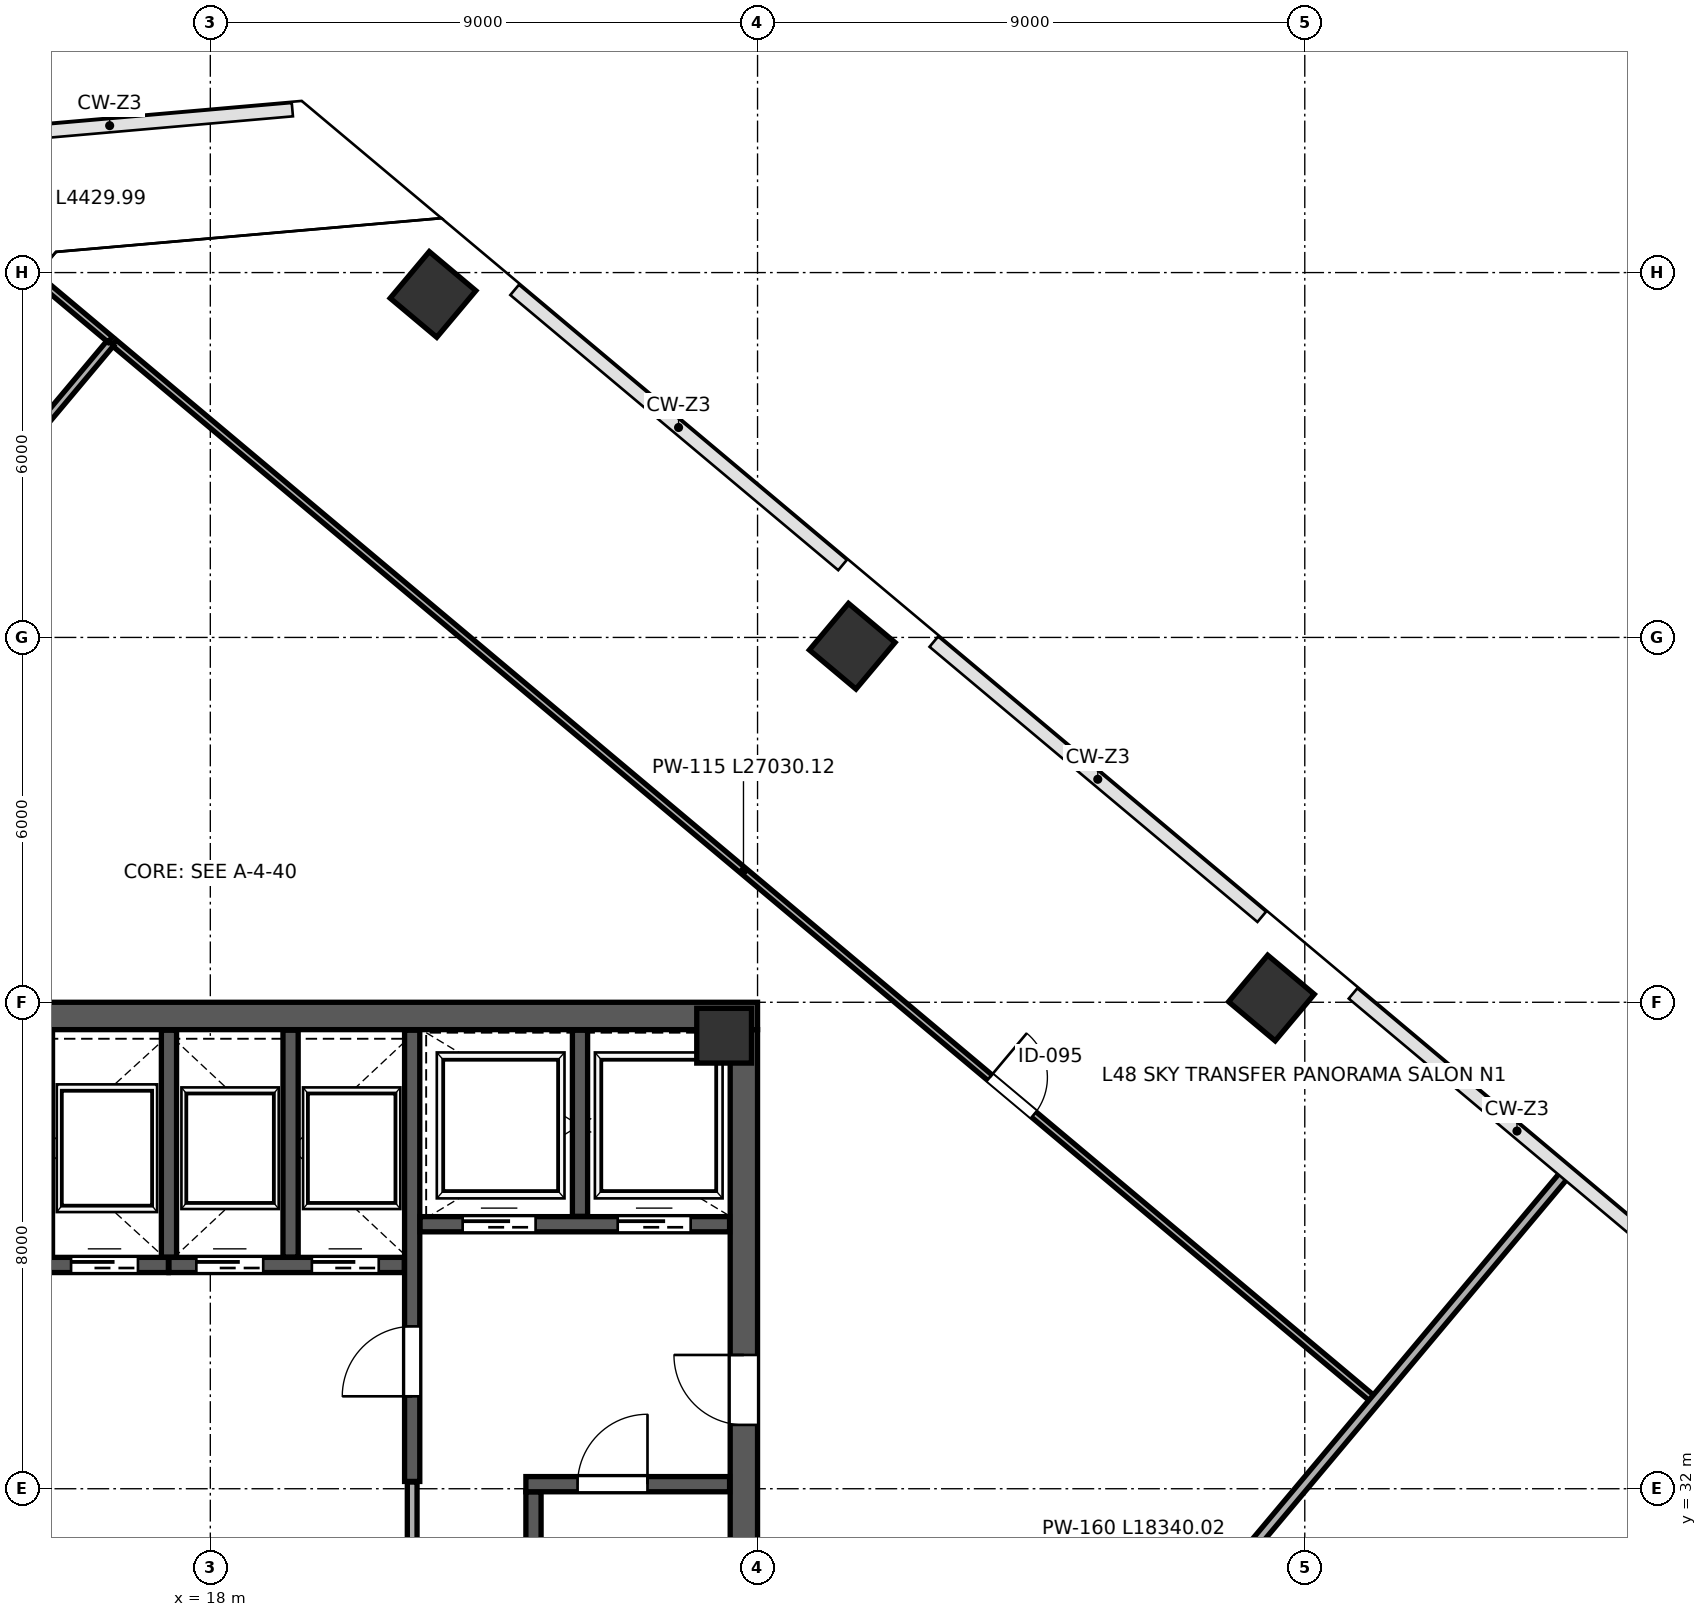
"""IFC4 building model, lengths in metres.
Left out: names, types, materials, properties, quantities, classifications, styles, units other than length and angle.
Written with IfcOpenShell. Run it as: python <this file> out.ifc"""

import sys

from ifc_helpers import new_model, si_unit, direction, frame, frame_2d, origin, origin_2d, place, context, subcontext, project, spatial, rectangle, extrude, source, transform, mapped, element, fill, save


model = new_model("IFC4")
c1 = context("Model", 3, precision=1e-05, world=origin(), true_north=direction((0.0, 1.0)))
c2 = subcontext(c1, "Body", "Model", "MODEL_VIEW")
j1 = project(units=[si_unit("LENGTHUNIT", "METRE"), si_unit("PLANEANGLEUNIT", "RADIAN")], contexts=[c1])
p1 = place(None, origin())
s1 = spatial("IfcSite", under=j1, at=p1, CompositionType="ELEMENT")
p2 = place(p1, origin())
s2 = spatial("IfcBuilding", under=s1, at=p2, CompositionType="ELEMENT")
p3 = place(p2, frame((0.0, 0.0, 215.2)))
s3 = spatial("IfcBuildingStorey", under=s2, at=p3, CompositionType="ELEMENT", Elevation=215.2)
m1 = source(origin(), c2, "Body", "SweptSolid", [
    extrude(rectangle(XDim=0.9, YDim=0.9, at=origin_2d()), origin(), (0.0, 0.0, 1.0), 5.399),
])
p4 = place(p3, frame((26.45, 39.45, 0.001), z_axis=(0.0, 0.0, 1.0), x_axis=(1.0, 0.0, 0.0)))
e1 = element("IfcColumn", 1, at=p4, inside=s3, PredefinedType="COLUMN", context=c2, shape_type="MappedRepresentation", body=[
    mapped(m1, transform((0.0, 0.0, 0.0), scale=1.0)),
])
m2 = source(origin(), c2, "Body", "SweptSolid", [
    extrude(rectangle(XDim=1.0, YDim=1.0, at=origin_2d()), origin(), (0.0, 0.0, 1.0), 5.399),
])
for number, where, z_axis, x_axis in (
    (2, (21.663, 51.64, 0.001), (0.0, 0.0, 1.0), (-0.766, 0.643, 0.0)),
    (3, (28.557, 45.855, 0.001), (0.0, 0.0, 1.0), (-0.766, 0.643, 0.0)),
    (4, (35.451, 40.07, 0.001), (0.0, 0.0, 1.0), (-0.766, 0.643, 0.0)),
):
    element("IfcColumn", number, at=place(p3, frame(where, z_axis=z_axis, x_axis=x_axis)), inside=s3, PredefinedType="COLUMN", context=c2, shape_type="MappedRepresentation", body=[
        mapped(m2, transform((0.0, 0.0, 0.0), scale=1.0)),
    ])
p5 = place(p3, frame((26.775, 24.45, 0.0), z_axis=(0.0, 0.0, 1.0), x_axis=(0.0, 1.0, 0.0)))
e5 = element("IfcWall", 5, at=p5, inside=s3, PredefinedType="SHEAR", context=c2, shape_type="SweptSolid", body=[
    extrude(rectangle(XDim=15.1, YDim=0.45, at=frame_2d((7.55, 0.0))), origin(), (0.0, 0.0, 1.0), 5.16),
])
p6 = place(p5, frame((8.6, 0.0, 0.0)))
e6 = element("IfcOpeningElement", 6, at=p6, cuts=e5, PredefinedType="OPENING", context=c2, shape_type="SweptSolid", body=[
    extrude(rectangle(XDim=1.15, YDim=2.2, at=frame_2d((0.575, 1.1))), frame((0.0, 0.235, 0.0), z_axis=(0.0, -1.0, 0.0), x_axis=(1.0, 0.0, 0.0)), (0.0, 0.0, 1.0), 0.47),
])
p7 = place(p3, frame((9.0, 39.775, 0.0), z_axis=(0.0, 0.0, 1.0), x_axis=(1.0, 0.0, 0.0)))
e7 = element("IfcWall", 7, at=p7, inside=s3, PredefinedType="SHEAR", context=c2, shape_type="SweptSolid", body=[
    extrude(rectangle(XDim=18.0, YDim=0.45, at=frame_2d((9.0, 0.0))), origin(), (0.0, 0.0, 1.0), 5.16),
])
p8 = place(p3, frame((23.315, 24.46, 0.0), z_axis=(0.0, 0.0, 1.0), x_axis=(0.0, 1.0, 0.0)))
e8 = element("IfcWall", 8, at=p8, inside=s3, PredefinedType="SHEAR", context=c2, shape_type="SweptSolid", body=[
    extrude(rectangle(XDim=7.49, YDim=0.25, at=frame_2d((3.745, 0.0))), origin(), (0.0, 0.0, 1.0), 5.16),
])
p9 = place(p3, frame((23.19, 32.075, 0.0), z_axis=(0.0, 0.0, 1.0), x_axis=(1.0, 0.0, 0.0)))
e9 = element("IfcWall", 9, at=p9, inside=s3, PredefinedType="SHEAR", context=c2, shape_type="SweptSolid", body=[
    extrude(rectangle(XDim=3.35, YDim=0.25, at=frame_2d((1.675, 0.0))), origin(), (0.0, 0.0, 1.0), 5.16),
])
p10 = place(p9, frame((0.85, 0.0, 0.0)))
e10 = element("IfcOpeningElement", 10, at=p10, cuts=e9, PredefinedType="OPENING", context=c2, shape_type="SweptSolid", body=[
    extrude(rectangle(XDim=1.15, YDim=2.2, at=frame_2d((0.575, 1.1))), frame((0.0, 0.135, 0.0), z_axis=(0.0, -1.0, 0.0), x_axis=(1.0, 0.0, 0.0)), (0.0, 0.0, 1.0), 0.27),
])
p11 = place(p3, frame((21.32, 32.12, 0.0), z_axis=(0.0, 0.0, 1.0), x_axis=(0.0, 1.0, 0.0)))
e11 = element("IfcWall", 11, at=p11, inside=s3, PredefinedType="SHEAR", context=c2, shape_type="SweptSolid", body=[
    extrude(rectangle(XDim=7.42, YDim=0.25, at=frame_2d((3.71, 0.0))), origin(), (0.0, 0.0, 1.0), 5.16),
])
p12 = place(p11, frame((1.4, 0.0, 0.0)))
e12 = element("IfcOpeningElement", 12, at=p12, cuts=e11, PredefinedType="OPENING", context=c2, shape_type="SweptSolid", body=[
    extrude(rectangle(XDim=1.15, YDim=2.2, at=frame_2d((0.575, 1.1))), frame((0.0, 0.135, 0.0), z_axis=(0.0, -1.0, 0.0), x_axis=(1.0, 0.0, 0.0)), (0.0, 0.0, 1.0), 0.27),
])
p13 = place(p3, frame((21.45, 36.35, 0.0), z_axis=(0.0, 0.0, 1.0), x_axis=(1.0, 0.0, 0.0)))
e13 = element("IfcWall", 13, at=p13, inside=s3, PredefinedType="SHEAR", context=c2, shape_type="SweptSolid", body=[
    extrude(rectangle(XDim=5.09, YDim=0.25, at=frame_2d((2.545, 0.0))), origin(), (0.0, 0.0, 1.0), 5.16),
])
p14 = place(p13, frame((0.7, 0.0, 0.0)))
e14 = element("IfcOpeningElement", 14, at=p14, cuts=e13, PredefinedType="OPENING", context=c2, shape_type="SweptSolid", body=[
    extrude(rectangle(XDim=1.2, YDim=2.2, at=frame_2d((0.6, 1.1))), frame((0.0, 0.135, 0.0), z_axis=(0.0, -1.0, 0.0), x_axis=(1.0, 0.0, 0.0)), (0.0, 0.0, 1.0), 0.27),
])
p15 = place(p13, frame((3.25, 0.0, 0.0)))
e15 = element("IfcOpeningElement", 15, at=p15, cuts=e13, PredefinedType="OPENING", context=c2, shape_type="SweptSolid", body=[
    extrude(rectangle(XDim=1.2, YDim=2.2, at=frame_2d((0.6, 1.1))), frame((0.0, 0.135, 0.0), z_axis=(0.0, -1.0, 0.0), x_axis=(1.0, 0.0, 0.0)), (0.0, 0.0, 1.0), 0.27),
])
p16 = place(p3, frame((24.08, 36.48, 0.0), z_axis=(0.0, 0.0, 1.0), x_axis=(0.0, 1.0, 0.0)))
e16 = element("IfcWall", 16, at=p16, inside=s3, PredefinedType="SHEAR", context=c2, shape_type="SweptSolid", body=[
    extrude(rectangle(XDim=3.06, YDim=0.25, at=frame_2d((1.53, 0.0))), origin(), (0.0, 0.0, 1.0), 5.16),
])
p17 = place(p3, frame((13.06, 35.68, 0.0), z_axis=(0.0, 0.0, 1.0), x_axis=(1.0, 0.0, 0.0)))
e17 = element("IfcWall", 17, at=p17, inside=s3, PredefinedType="SHEAR", context=c2, shape_type="SweptSolid", body=[
    extrude(rectangle(XDim=4.25, YDim=0.25, at=frame_2d((2.125, 0.0))), origin(), (0.0, 0.0, 1.0), 5.16),
])
p18 = place(p17, frame((0.65, 0.0, 0.0)))
e18 = element("IfcOpeningElement", 18, at=p18, cuts=e17, PredefinedType="OPENING", context=c2, shape_type="SweptSolid", body=[
    extrude(rectangle(XDim=1.1, YDim=2.2, at=frame_2d((0.55, 1.1))), frame((0.0, 0.135, 0.0), z_axis=(0.0, -1.0, 0.0), x_axis=(1.0, 0.0, 0.0)), (0.0, 0.0, 1.0), 0.27),
])
p19 = place(p17, frame((2.65, 0.0, 0.0)))
e19 = element("IfcOpeningElement", 19, at=p19, cuts=e17, PredefinedType="OPENING", context=c2, shape_type="SweptSolid", body=[
    extrude(rectangle(XDim=1.1, YDim=2.2, at=frame_2d((0.55, 1.1))), frame((0.0, 0.135, 0.0), z_axis=(0.0, -1.0, 0.0), x_axis=(1.0, 0.0, 0.0)), (0.0, 0.0, 1.0), 0.27),
])
p20 = place(p3, frame((15.28, 35.81, 0.0), z_axis=(0.0, 0.0, 1.0), x_axis=(0.0, 1.0, 0.0)))
e20 = element("IfcWall", 20, at=p20, inside=s3, PredefinedType="SHEAR", context=c2, shape_type="SweptSolid", body=[
    extrude(rectangle(XDim=3.73, YDim=0.25, at=frame_2d((1.865, 0.0))), origin(), (0.0, 0.0, 1.0), 5.16),
])
p21 = place(p3, frame((17.32, 35.68, 0.0), z_axis=(0.0, 0.0, 1.0), x_axis=(1.0, 0.0, 0.0)))
e21 = element("IfcWall", 21, at=p21, inside=s3, PredefinedType="SHEAR", context=c2, shape_type="SweptSolid", body=[
    extrude(rectangle(XDim=3.87, YDim=0.25, at=frame_2d((1.935, 0.0))), origin(), (0.0, 0.0, 1.0), 5.16),
])
p22 = place(p21, frame((0.45, 0.0, 0.0)))
e22 = element("IfcOpeningElement", 22, at=p22, cuts=e21, PredefinedType="OPENING", context=c2, shape_type="SweptSolid", body=[
    extrude(rectangle(XDim=1.1, YDim=2.2, at=frame_2d((0.55, 1.1))), frame((0.0, 0.135, 0.0), z_axis=(0.0, -1.0, 0.0), x_axis=(1.0, 0.0, 0.0)), (0.0, 0.0, 1.0), 0.27),
])
p23 = place(p21, frame((2.35, 0.0, 0.0)))
e23 = element("IfcOpeningElement", 23, at=p23, cuts=e21, PredefinedType="OPENING", context=c2, shape_type="SweptSolid", body=[
    extrude(rectangle(XDim=1.1, YDim=2.2, at=frame_2d((0.55, 1.1))), frame((0.0, 0.135, 0.0), z_axis=(0.0, -1.0, 0.0), x_axis=(1.0, 0.0, 0.0)), (0.0, 0.0, 1.0), 0.27),
])
for number, where, z_axis, x_axis in (
    (24, (17.32, 35.81, 0.0), (0.0, 0.0, 1.0), (0.0, 1.0, 0.0)),
    (25, (19.32, 35.81, 0.0), (0.0, 0.0, 1.0), (0.0, 1.0, 0.0)),
):
    element("IfcWall", number, at=place(p3, frame(where, z_axis=z_axis, x_axis=x_axis)), inside=s3, PredefinedType="SHEAR", context=c2, shape_type="SweptSolid", body=[
        extrude(rectangle(XDim=3.73, YDim=0.25, at=frame_2d((1.865, 0.0))), origin(), (0.0, 0.0, 1.0), 5.16),
    ])
p24 = place(p3, frame((21.32, 29.19, 0.0), z_axis=(0.0, 0.0, 1.0), x_axis=(0.0, 1.0, 0.0)))
e26 = element("IfcWall", 26, at=p24, inside=s3, PredefinedType="PARTITIONING", context=c2, shape_type="SweptSolid", body=[
    extrude(rectangle(XDim=2.92, YDim=0.16, at=frame_2d((1.46, 0.0))), origin(), (0.0, 0.0, 1.0), 5.16),
])
p25 = place(p3, frame((16.416, 50.848, 0.0), z_axis=(0.0, 0.0, 1.0), x_axis=(0.766042472976, -0.642789957604, 0.0)))
e27 = element("IfcWall", 27, at=p25, inside=s3, PredefinedType="PARTITIONING", context=c2, shape_type="SweptSolid", body=[
    extrude(rectangle(XDim=27.03, YDim=0.115, at=frame_2d((13.515, 0.0))), origin(), (0.0, 0.0, 1.0), 5.16),
])
p26 = place(p25, frame((18.8, 0.0, 0.0)))
e28 = element("IfcOpeningElement", 28, at=p26, cuts=e27, PredefinedType="OPENING", context=c2, shape_type="SweptSolid", body=[
    extrude(rectangle(XDim=0.95, YDim=2.15, at=frame_2d((0.475, 1.075))), frame((0.0, 0.067, 0.0), z_axis=(0.0, -1.0, 0.0), x_axis=(1.0, 0.0, 0.0)), (0.0, 0.0, 1.0), 0.135),
])
p27 = place(p3, frame((0.894, 32.412, 0.0), z_axis=(0.0, 0.0, 1.0), x_axis=(0.64277673271, 0.766053569854, 0.0)))
e29 = element("IfcWall", 29, at=p27, inside=s3, PredefinedType="PARTITIONING", context=c2, shape_type="SweptSolid", body=[
    extrude(rectangle(XDim=24.06, YDim=0.135, at=frame_2d((12.03, 0.0))), origin(), (0.0, 0.0, 1.0), 5.16),
])
p28 = place(p27, frame((2.2, 0.0, 0.0)))
e30 = element("IfcOpeningElement", 30, at=p28, cuts=e29, PredefinedType="OPENING", context=c2, shape_type="SweptSolid", body=[
    extrude(rectangle(XDim=0.95, YDim=2.15, at=frame_2d((0.475, 1.075))), frame((0.0, 0.078, 0.0), z_axis=(0.0, -1.0, 0.0), x_axis=(1.0, 0.0, 0.0)), (0.0, 0.0, 1.0), 0.155),
])
p29 = place(p3, frame((12.961, 53.747, 0.0), z_axis=(0.0, 0.0, 1.0), x_axis=(0.766057601156, -0.642771928222, 0.0)))
e31 = element("IfcWall", 31, at=p29, inside=s3, PredefinedType="PARTITIONING", context=c2, shape_type="SweptSolid", body=[
    extrude(rectangle(XDim=4.43, YDim=0.115, at=frame_2d((2.215, 0.0))), origin(), (0.0, 0.0, 1.0), 5.16),
])
p30 = place(p3, frame((28.481, 23.114, 0.0), z_axis=(0.0, 0.0, 1.0), x_axis=(0.642788958176, 0.7660433116, 0.0)))
e32 = element("IfcWall", 32, at=p30, inside=s3, PredefinedType="PARTITIONING", context=c2, shape_type="SweptSolid", body=[
    extrude(rectangle(XDim=18.34, YDim=0.16, at=frame_2d((9.17, 0.0))), origin(), (0.0, 0.0, 1.0), 4.395),
])
m3 = source(origin(), c2, "Body", "SweptSolid", [
    extrude(rectangle(XDim=1.15, YDim=2.2, at=frame_2d((0.575, 1.1))), frame((0.0, 0.025, 0.0), z_axis=(0.0, -1.0, 0.0), x_axis=(1.0, 0.0, 0.0)), (0.0, 0.0, 1.0), 0.05),
])
p31 = place(p12, origin())
e33 = element("IfcDoor", 33, at=p31, inside=s3, OperationType="SINGLE_SWING_LEFT", PredefinedType="DOOR", context=c2, shape_type="MappedRepresentation", body=[
    mapped(m3, transform((0.0, 0.0, 0.0), scale=1.0)),
])
fill(e12, e33)
m4 = source(origin(), c2, "Body", "SweptSolid", [
    extrude(rectangle(XDim=1.15, YDim=2.2, at=frame_2d((0.575, 1.1))), frame((0.0, 0.025, 0.0), z_axis=(0.0, -1.0, 0.0), x_axis=(1.0, 0.0, 0.0)), (0.0, 0.0, 1.0), 0.05),
])
p32 = place(p10, origin())
e34 = element("IfcDoor", 34, at=p32, inside=s3, OperationType="SINGLE_SWING_RIGHT", PredefinedType="DOOR", context=c2, shape_type="MappedRepresentation", body=[
    mapped(m4, transform((0.0, 0.0, 0.0), scale=1.0)),
])
fill(e10, e34)
p33 = place(p6, origin())
e35 = element("IfcDoor", 35, at=p33, inside=s3, OperationType="SINGLE_SWING_RIGHT", PredefinedType="DOOR", context=c2, shape_type="MappedRepresentation", body=[
    mapped(m3, transform((0.0, 0.0, 0.0), scale=1.0)),
])
fill(e6, e35)
m5 = source(origin(), c2, "Body", "SweptSolid", [
    extrude(rectangle(XDim=1.1, YDim=2.2, at=frame_2d((0.55, 1.1))), frame((0.0, 0.025, 0.0), z_axis=(0.0, -1.0, 0.0), x_axis=(1.0, 0.0, 0.0)), (0.0, 0.0, 1.0), 0.05),
])
p34 = place(p19, origin())
e36 = element("IfcDoor", 36, at=p34, inside=s3, OperationType="SLIDING_TO_RIGHT", PredefinedType="DOOR", context=c2, shape_type="MappedRepresentation", body=[
    mapped(m5, transform((0.0, 0.0, 0.0), scale=1.0)),
])
fill(e19, e36)
p35 = place(p22, origin())
e37 = element("IfcDoor", 37, at=p35, inside=s3, OperationType="SLIDING_TO_LEFT", PredefinedType="DOOR", context=c2, shape_type="MappedRepresentation", body=[
    mapped(m5, transform((0.0, 0.0, 0.0), scale=1.0)),
])
fill(e22, e37)
p36 = place(p23, origin())
e38 = element("IfcDoor", 38, at=p36, inside=s3, OperationType="SLIDING_TO_RIGHT", PredefinedType="DOOR", context=c2, shape_type="MappedRepresentation", body=[
    mapped(m5, transform((0.0, 0.0, 0.0), scale=1.0)),
])
fill(e23, e38)
m6 = source(origin(), c2, "Body", "SweptSolid", [
    extrude(rectangle(XDim=1.2, YDim=2.2, at=frame_2d((0.6, 1.1))), frame((0.0, 0.025, 0.0), z_axis=(0.0, -1.0, 0.0), x_axis=(1.0, 0.0, 0.0)), (0.0, 0.0, 1.0), 0.05),
])
p37 = place(p14, origin())
e39 = element("IfcDoor", 39, at=p37, inside=s3, OperationType="SLIDING_TO_LEFT", PredefinedType="DOOR", context=c2, shape_type="MappedRepresentation", body=[
    mapped(m6, transform((0.0, 0.0, 0.0), scale=1.0)),
])
fill(e14, e39)
p38 = place(p15, origin())
e40 = element("IfcDoor", 40, at=p38, inside=s3, OperationType="SLIDING_TO_RIGHT", PredefinedType="DOOR", context=c2, shape_type="MappedRepresentation", body=[
    mapped(m6, transform((0.0, 0.0, 0.0), scale=1.0)),
])
fill(e15, e40)
m7 = source(origin(), c2, "Body", "SweptSolid", [
    extrude(rectangle(XDim=0.95, YDim=2.15, at=frame_2d((0.475, 1.075))), frame((0.0, 0.025, 0.0), z_axis=(0.0, -1.0, 0.0), x_axis=(1.0, 0.0, 0.0)), (0.0, 0.0, 1.0), 0.05),
])
p39 = place(p26, origin())
e41 = element("IfcDoor", 41, at=p39, inside=s3, OperationType="SINGLE_SWING_LEFT", PredefinedType="DOOR", context=c2, shape_type="MappedRepresentation", body=[
    mapped(m7, transform((0.0, 0.0, 0.0), scale=1.0)),
])
fill(e28, e41)
save(model, sys.argv[1])
